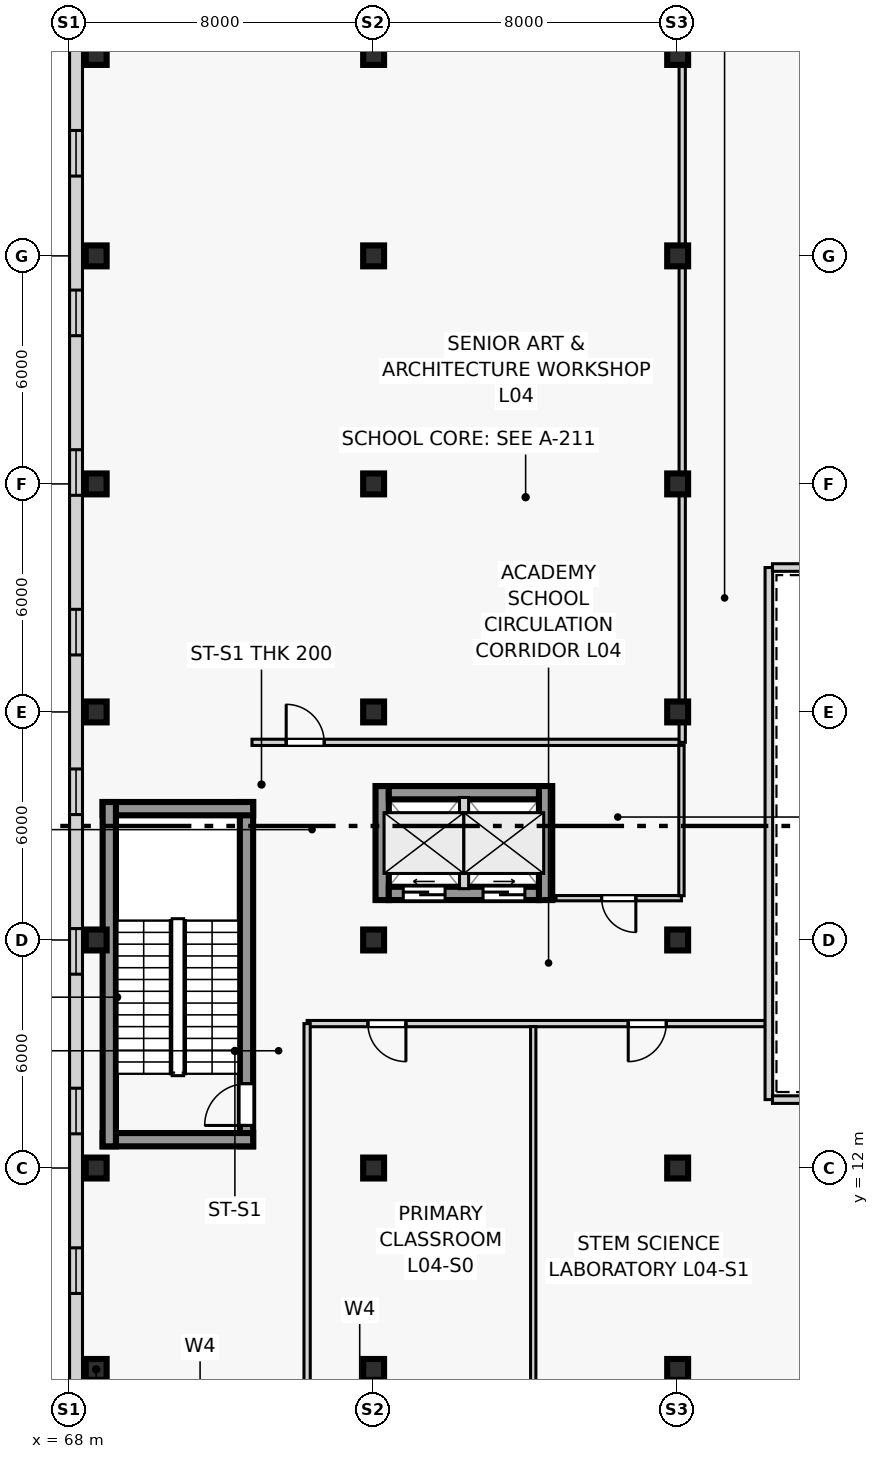
"""IFC4 building model, lengths in metres.
Left out: names, types, materials, properties, quantities, classifications, styles, units other than length and angle.
Written with IfcOpenShell. Run it as: python <this file> out.ifc"""

import sys

from ifc_helpers import new_model, si_unit, direction, frame, frame_2d, origin, origin_2d, place, context, subcontext, project, spatial, rectangle, extrude, source, transform, mapped, element, fill, save


model = new_model("IFC4")
c1 = context("Model", 3, precision=1e-05, world=origin(), true_north=direction((0.0, 1.0)))
c2 = subcontext(c1, "Body", "Model", "MODEL_VIEW")
j1 = project(units=[si_unit("LENGTHUNIT", "METRE"), si_unit("PLANEANGLEUNIT", "RADIAN")], contexts=[c1])
p1 = place(None, origin())
s1 = spatial("IfcSite", under=j1, at=p1, CompositionType="ELEMENT")
p2 = place(p1, origin())
s2 = spatial("IfcBuilding", under=s1, at=p2, CompositionType="ELEMENT")
p3 = place(p2, frame((0.0, 0.0, 18.0)))
s3 = spatial("IfcBuildingStorey", under=s2, at=p3, CompositionType="ELEMENT", Elevation=18.0)
p4 = place(p3, frame((72.655, 12.57, 0.0), z_axis=(0.0, 0.0, 1.0), x_axis=(0.0, 1.0, 0.0)))
e1 = element("IfcWall", 1, at=p4, inside=s3, PredefinedType="SHEAR", context=c2, shape_type="SweptSolid", body=[
    extrude(rectangle(XDim=9.06, YDim=0.35, at=frame_2d((4.53, 0.0))), origin(), (0.0, 0.0, 1.0), 4.5),
])
p5 = place(p4, frame((0.55, 0.0, 0.0)))
e2 = element("IfcOpeningElement", 2, at=p5, cuts=e1, PredefinedType="OPENING", context=c2, shape_type="SweptSolid", body=[
    extrude(rectangle(XDim=1.1, YDim=2.2, at=frame_2d((0.55, 1.1))), frame((0.0, 0.185, 0.0), z_axis=(0.0, -1.0, 0.0), x_axis=(1.0, 0.0, 0.0)), (0.0, 0.0, 1.0), 0.37),
])
for number, where, z_axis, x_axis in (
    (3, (68.87, 12.745, 0.0), (0.0, 0.0, 1.0), (1.0, 0.0, 0.0)),
    (4, (68.87, 21.455, 0.0), (0.0, 0.0, 1.0), (1.0, 0.0, 0.0)),
):
    element("IfcWall", number, at=place(p3, frame(where, z_axis=z_axis, x_axis=x_axis)), inside=s3, PredefinedType="SHEAR", context=c2, shape_type="SweptSolid", body=[
        extrude(rectangle(XDim=3.96, YDim=0.35, at=frame_2d((1.98, 0.0))), origin(), (0.0, 0.0, 1.0), 4.5),
    ])
p6 = place(p3, frame((69.045, 12.57, 0.0), z_axis=(0.0, 0.0, 1.0), x_axis=(0.0, 1.0, 0.0)))
e5 = element("IfcWall", 5, at=p6, inside=s3, PredefinedType="SHEAR", context=c2, shape_type="SweptSolid", body=[
    extrude(rectangle(XDim=9.06, YDim=0.35, at=frame_2d((4.53, 0.0))), origin(), (0.0, 0.0, 1.0), 4.5),
])
for number, where, z_axis, x_axis in (
    (6, (76.225, 19.05, 0.0), (0.0, 0.0, 1.0), (0.0, 1.0, 0.0)),
    (7, (80.525, 19.05, 0.0), (0.0, 0.0, 1.0), (0.0, 1.0, 0.0)),
):
    element("IfcWall", number, at=place(p3, frame(where, z_axis=z_axis, x_axis=x_axis)), inside=s3, PredefinedType="SHEAR", context=c2, shape_type="SweptSolid", body=[
        extrude(rectangle(XDim=3.0, YDim=0.35, at=frame_2d((1.5, 0.0))), origin(), (0.0, 0.0, 1.0), 4.5),
    ])
p7 = place(p3, frame((76.4, 21.875, 0.0), z_axis=(0.0, 0.0, 1.0), x_axis=(1.0, 0.0, 0.0)))
e8 = element("IfcWall", 8, at=p7, inside=s3, PredefinedType="SHEAR", context=c2, shape_type="SweptSolid", body=[
    extrude(rectangle(XDim=3.95, YDim=0.35, at=frame_2d((1.975, 0.0))), origin(), (0.0, 0.0, 1.0), 4.5),
])
p8 = place(p3, frame((76.4, 19.225, 0.0), z_axis=(0.0, 0.0, 1.0), x_axis=(1.0, 0.0, 0.0)))
e9 = element("IfcWall", 9, at=p8, inside=s3, PredefinedType="SHEAR", context=c2, shape_type="SweptSolid", body=[
    extrude(rectangle(XDim=3.95, YDim=0.35, at=frame_2d((1.975, 0.0))), origin(), (0.0, 0.0, 1.0), 4.5),
])
p9 = place(p8, frame((0.38, 0.0, 0.0)))
e10 = element("IfcOpeningElement", 10, at=p9, cuts=e9, PredefinedType="OPENING", context=c2, shape_type="SweptSolid", body=[
    extrude(rectangle(XDim=1.1, YDim=2.2, at=frame_2d((0.55, 1.1))), frame((0.0, 0.185, 0.0), z_axis=(0.0, -1.0, 0.0), x_axis=(1.0, 0.0, 0.0)), (0.0, 0.0, 1.0), 0.37),
])
p10 = place(p8, frame((2.48, 0.0, 0.0)))
e11 = element("IfcOpeningElement", 11, at=p10, cuts=e9, PredefinedType="OPENING", context=c2, shape_type="SweptSolid", body=[
    extrude(rectangle(XDim=1.1, YDim=2.2, at=frame_2d((0.55, 1.1))), frame((0.0, 0.185, 0.0), z_axis=(0.0, -1.0, 0.0), x_axis=(1.0, 0.0, 0.0)), (0.0, 0.0, 1.0), 0.37),
])
m1 = source(origin(), c2, "Body", "SweptSolid", [
    extrude(rectangle(XDim=0.55, YDim=0.55, at=origin_2d()), origin(), (0.0, 0.0, 1.0), 4.5),
])
for number, where, z_axis, x_axis in (
    (12, (68.7, 6.7, 0.0), (0.0, 0.0, 1.0), (1.0, 0.0, 0.0)),
    (13, (68.7, 12.0, 0.0), (0.0, 0.0, 1.0), (1.0, 0.0, 0.0)),
    (14, (68.7, 18.0, 0.0), (0.0, 0.0, 1.0), (1.0, 0.0, 0.0)),
    (15, (68.7, 24.0, 0.0), (0.0, 0.0, 1.0), (1.0, 0.0, 0.0)),
    (16, (68.7, 30.0, 0.0), (0.0, 0.0, 1.0), (1.0, 0.0, 0.0)),
    (17, (68.7, 36.0, 0.0), (0.0, 0.0, 1.0), (1.0, 0.0, 0.0)),
    (18, (68.7, 41.3, 0.0), (0.0, 0.0, 1.0), (1.0, 0.0, 0.0)),
    (19, (76.0, 6.7, 0.0), (0.0, 0.0, 1.0), (1.0, 0.0, 0.0)),
    (20, (76.0, 12.0, 0.0), (0.0, 0.0, 1.0), (1.0, 0.0, 0.0)),
    (21, (76.0, 18.0, 0.0), (0.0, 0.0, 1.0), (1.0, 0.0, 0.0)),
    (22, (76.0, 24.0, 0.0), (0.0, 0.0, 1.0), (1.0, 0.0, 0.0)),
    (23, (76.0, 30.0, 0.0), (0.0, 0.0, 1.0), (1.0, 0.0, 0.0)),
    (24, (76.0, 36.0, 0.0), (0.0, 0.0, 1.0), (1.0, 0.0, 0.0)),
    (25, (76.0, 41.3, 0.0), (0.0, 0.0, 1.0), (1.0, 0.0, 0.0)),
    (26, (84.0, 6.7, 0.0), (0.0, 0.0, 1.0), (1.0, 0.0, 0.0)),
    (27, (84.0, 12.0, 0.0), (0.0, 0.0, 1.0), (1.0, 0.0, 0.0)),
    (28, (84.0, 18.0, 0.0), (0.0, 0.0, 1.0), (1.0, 0.0, 0.0)),
    (29, (84.0, 24.0, 0.0), (0.0, 0.0, 1.0), (1.0, 0.0, 0.0)),
    (30, (84.0, 30.0, 0.0), (0.0, 0.0, 1.0), (1.0, 0.0, 0.0)),
    (31, (84.0, 36.0, 0.0), (0.0, 0.0, 1.0), (1.0, 0.0, 0.0)),
    (32, (84.0, 41.3, 0.0), (0.0, 0.0, 1.0), (1.0, 0.0, 0.0)),
):
    element("IfcColumn", number, at=place(p3, frame(where, z_axis=z_axis, x_axis=x_axis)), inside=s3, PredefinedType="COLUMN", context=c2, shape_type="MappedRepresentation", body=[
        mapped(m1, transform((0.0, 0.0, 0.0), scale=1.0)),
    ])
p11 = place(p3, frame((68.17, 41.83, 0.0), z_axis=(0.0, 0.0, 1.0), x_axis=(0.0, -1.0, 0.0)))
e33 = element("IfcWall", 33, at=p11, inside=s3, PredefinedType="SOLIDWALL", context=c2, shape_type="SweptSolid", body=[
    extrude(rectangle(XDim=35.66, YDim=0.34, at=frame_2d((17.83, 0.0))), origin(), (0.0, 0.0, 1.0), 4.2),
])
p12 = place(p11, frame((2.53, 0.0, 0.95)))
e34 = element("IfcOpeningElement", 34, at=p12, cuts=e33, PredefinedType="OPENING", context=c2, shape_type="SweptSolid", body=[
    extrude(rectangle(XDim=1.2, YDim=1.5, at=frame_2d((0.6, 0.75))), frame((0.0, 0.18, 0.0), z_axis=(0.0, -1.0, 0.0), x_axis=(1.0, 0.0, 0.0)), (0.0, 0.0, 1.0), 0.36),
])
p13 = place(p11, frame((6.73, 0.0, 0.95)))
e35 = element("IfcOpeningElement", 35, at=p13, cuts=e33, PredefinedType="OPENING", context=c2, shape_type="SweptSolid", body=[
    extrude(rectangle(XDim=1.2, YDim=1.5, at=frame_2d((0.6, 0.75))), frame((0.0, 0.18, 0.0), z_axis=(0.0, -1.0, 0.0), x_axis=(1.0, 0.0, 0.0)), (0.0, 0.0, 1.0), 0.36),
])
p14 = place(p11, frame((10.93, 0.0, 0.95)))
e36 = element("IfcOpeningElement", 36, at=p14, cuts=e33, PredefinedType="OPENING", context=c2, shape_type="SweptSolid", body=[
    extrude(rectangle(XDim=1.2, YDim=1.5, at=frame_2d((0.6, 0.75))), frame((0.0, 0.18, 0.0), z_axis=(0.0, -1.0, 0.0), x_axis=(1.0, 0.0, 0.0)), (0.0, 0.0, 1.0), 0.36),
])
p15 = place(p11, frame((15.13, 0.0, 0.95)))
e37 = element("IfcOpeningElement", 37, at=p15, cuts=e33, PredefinedType="OPENING", context=c2, shape_type="SweptSolid", body=[
    extrude(rectangle(XDim=1.2, YDim=1.5, at=frame_2d((0.6, 0.75))), frame((0.0, 0.18, 0.0), z_axis=(0.0, -1.0, 0.0), x_axis=(1.0, 0.0, 0.0)), (0.0, 0.0, 1.0), 0.36),
])
p16 = place(p11, frame((19.33, 0.0, 0.95)))
e38 = element("IfcOpeningElement", 38, at=p16, cuts=e33, PredefinedType="OPENING", context=c2, shape_type="SweptSolid", body=[
    extrude(rectangle(XDim=1.2, YDim=1.5, at=frame_2d((0.6, 0.75))), frame((0.0, 0.18, 0.0), z_axis=(0.0, -1.0, 0.0), x_axis=(1.0, 0.0, 0.0)), (0.0, 0.0, 1.0), 0.36),
])
p17 = place(p11, frame((23.53, 0.0, 0.95)))
e39 = element("IfcOpeningElement", 39, at=p17, cuts=e33, PredefinedType="OPENING", context=c2, shape_type="SweptSolid", body=[
    extrude(rectangle(XDim=1.2, YDim=1.5, at=frame_2d((0.6, 0.75))), frame((0.0, 0.18, 0.0), z_axis=(0.0, -1.0, 0.0), x_axis=(1.0, 0.0, 0.0)), (0.0, 0.0, 1.0), 0.36),
])
p18 = place(p11, frame((27.73, 0.0, 0.95)))
e40 = element("IfcOpeningElement", 40, at=p18, cuts=e33, PredefinedType="OPENING", context=c2, shape_type="SweptSolid", body=[
    extrude(rectangle(XDim=1.2, YDim=1.5, at=frame_2d((0.6, 0.75))), frame((0.0, 0.18, 0.0), z_axis=(0.0, -1.0, 0.0), x_axis=(1.0, 0.0, 0.0)), (0.0, 0.0, 1.0), 0.36),
])
p19 = place(p11, frame((31.93, 0.0, 0.95)))
e41 = element("IfcOpeningElement", 41, at=p19, cuts=e33, PredefinedType="OPENING", context=c2, shape_type="SweptSolid", body=[
    extrude(rectangle(XDim=1.2, YDim=1.5, at=frame_2d((0.6, 0.75))), frame((0.0, 0.18, 0.0), z_axis=(0.0, -1.0, 0.0), x_axis=(1.0, 0.0, 0.0)), (0.0, 0.0, 1.0), 0.36),
])
p20 = place(p3, frame((78.38, 19.35, 0.0), z_axis=(0.0, 0.0, 1.0), x_axis=(0.0, 1.0, 0.0)))
e42 = element("IfcWall", 42, at=p20, inside=s3, PredefinedType="PARTITIONING", context=c2, shape_type="SweptSolid", body=[
    extrude(rectangle(XDim=2.4, YDim=0.24, at=frame_2d((1.2, 0.0))), origin(), (0.0, 0.0, 1.0), 4.19),
])
p21 = place(p3, frame((74.25, 15.8, 0.0), z_axis=(0.0, 0.0, 1.0), x_axis=(1.0, 0.0, 0.0)))
e43 = element("IfcWall", 43, at=p21, inside=s3, PredefinedType="PARTITIONING", context=c2, shape_type="SweptSolid", body=[
    extrude(rectangle(XDim=12.055, YDim=0.165, at=frame_2d((6.027, 0.0))), origin(), (0.0, 0.0, 1.0), 4.19),
])
p22 = place(p21, frame((1.6, 0.0, 0.0)))
e44 = element("IfcOpeningElement", 44, at=p22, cuts=e43, PredefinedType="OPENING", context=c2, shape_type="SweptSolid", body=[
    extrude(rectangle(XDim=1.0, YDim=2.15, at=frame_2d((0.5, 1.075))), frame((0.0, 0.093, 0.0), z_axis=(0.0, -1.0, 0.0), x_axis=(1.0, 0.0, 0.0)), (0.0, 0.0, 1.0), 0.185),
])
p23 = place(p21, frame((8.45, 0.0, 0.0)))
e45 = element("IfcOpeningElement", 45, at=p23, cuts=e43, PredefinedType="OPENING", context=c2, shape_type="SweptSolid", body=[
    extrude(rectangle(XDim=1.0, YDim=2.15, at=frame_2d((0.5, 1.075))), frame((0.0, 0.093, 0.0), z_axis=(0.0, -1.0, 0.0), x_axis=(1.0, 0.0, 0.0)), (0.0, 0.0, 1.0), 0.185),
])
p24 = place(p3, frame((72.8, 23.2, 0.0), z_axis=(0.0, 0.0, 1.0), x_axis=(1.0, 0.0, 0.0)))
e46 = element("IfcWall", 46, at=p24, inside=s3, PredefinedType="PARTITIONING", context=c2, shape_type="SweptSolid", body=[
    extrude(rectangle(XDim=11.242, YDim=0.165, at=frame_2d((5.621, 0.0))), origin(), (0.0, 0.0, 1.0), 4.19),
])
p25 = place(p24, frame((0.9, 0.0, 0.0)))
e47 = element("IfcOpeningElement", 47, at=p25, cuts=e46, PredefinedType="OPENING", context=c2, shape_type="SweptSolid", body=[
    extrude(rectangle(XDim=1.0, YDim=2.15, at=frame_2d((0.5, 1.075))), frame((0.0, 0.093, 0.0), z_axis=(0.0, -1.0, 0.0), x_axis=(1.0, 0.0, 0.0)), (0.0, 0.0, 1.0), 0.185),
])
p26 = place(p3, frame((80.8, 19.1, 0.0), z_axis=(0.0, 0.0, 1.0), x_axis=(1.0, 0.0, 0.0)))
e48 = element("IfcWall", 48, at=p26, inside=s3, PredefinedType="PLUMBINGWALL", context=c2, shape_type="SweptSolid", body=[
    extrude(rectangle(XDim=3.3, YDim=0.14, at=frame_2d((1.65, 0.0))), origin(), (0.0, 0.0, 1.0), 4.19),
])
p27 = place(p26, frame((1.2, 0.0, 0.0)))
e49 = element("IfcOpeningElement", 49, at=p27, cuts=e48, PredefinedType="OPENING", context=c2, shape_type="SweptSolid", body=[
    extrude(rectangle(XDim=0.9, YDim=2.1, at=frame_2d((0.45, 1.05))), frame((0.0, 0.08, 0.0), z_axis=(0.0, -1.0, 0.0), x_axis=(1.0, 0.0, 0.0)), (0.0, 0.0, 1.0), 0.16),
])
p28 = place(p3, frame((84.1, 19.165, 0.0), z_axis=(0.0, 0.0, 1.0), x_axis=(0.0, 1.0, 0.0)))
e50 = element("IfcWall", 50, at=p28, inside=s3, PredefinedType="PLUMBINGWALL", context=c2, shape_type="SweptSolid", body=[
    extrude(rectangle(XDim=3.958, YDim=0.14, at=frame_2d((1.979, 0.0))), origin(), (0.0, 0.0, 1.0), 3.54),
])
p29 = place(p3, frame((80.2, 6.185, 0.0), z_axis=(0.0, 0.0, 1.0), x_axis=(0.0, 1.0, 0.0)))
e51 = element("IfcWall", 51, at=p29, inside=s3, PredefinedType="PARTITIONING", context=c2, shape_type="SweptSolid", body=[
    extrude(rectangle(XDim=9.537, YDim=0.14, at=frame_2d((4.769, 0.0))), origin(), (0.0, 0.0, 1.0), 4.19),
])
p30 = place(p3, frame((86.4, 13.8, 0.0), z_axis=(0.0, 0.0, 1.0), x_axis=(0.0, 1.0, 0.0)))
e52 = element("IfcWall", 52, at=p30, inside=s3, PredefinedType="PARTITIONING", context=c2, shape_type="SweptSolid", body=[
    extrude(rectangle(XDim=14.0, YDim=0.2, at=frame_2d((7.0, 0.0))), origin(), (0.0, 0.0, 1.0), 4.19),
])
for number, where, z_axis, x_axis in (
    (53, (86.495, 27.8, 0.0), (0.0, 0.0, 1.0), (1.0, 0.0, 0.0)),
    (54, (86.495, 13.8, 0.0), (0.0, 0.0, 1.0), (1.0, 0.0, 0.0)),
):
    element("IfcWall", number, at=place(p3, frame(where, z_axis=z_axis, x_axis=x_axis)), inside=s3, PredefinedType="PARTITIONING", context=c2, shape_type="SweptSolid", body=[
        extrude(rectangle(XDim=16.01, YDim=0.2, at=frame_2d((8.005, 0.0))), origin(), (0.0, 0.0, 1.0), 4.19),
    ])
p31 = place(p3, frame((74.25, 6.185, 0.0), z_axis=(0.0, 0.0, 1.0), x_axis=(0.0, 1.0, 0.0)))
e55 = element("IfcWall", 55, at=p31, inside=s3, PredefinedType="PARTITIONING", context=c2, shape_type="SweptSolid", body=[
    extrude(rectangle(XDim=9.615, YDim=0.165, at=frame_2d((4.808, 0.0))), origin(), (0.0, 0.0, 1.0), 4.19),
])
p32 = place(p3, frame((84.12, 23.2, 0.0), z_axis=(0.0, 0.0, 1.0), x_axis=(0.0, 1.0, 0.0)))
e56 = element("IfcWall", 56, at=p32, inside=s3, PredefinedType="PARTITIONING", context=c2, shape_type="SweptSolid", body=[
    extrude(rectangle(XDim=18.615, YDim=0.165, at=frame_2d((9.308, 0.0))), origin(), (0.0, 0.0, 1.0), 3.54),
])
m2 = source(origin(), c2, "Body", "SweptSolid", [
    extrude(rectangle(XDim=1.2, YDim=1.5, at=frame_2d((0.6, 0.75))), frame((0.0, 0.03, 0.0), z_axis=(0.0, -1.0, 0.0), x_axis=(1.0, 0.0, 0.0)), (0.0, 0.0, 1.0), 0.06),
])
p33 = place(p12, origin())
e57 = element("IfcWindow", 57, at=p33, inside=s3, PartitioningType="SINGLE_PANEL", PredefinedType="WINDOW", context=c2, shape_type="MappedRepresentation", body=[
    mapped(m2, transform((0.0, 0.0, 0.0), scale=1.0)),
])
fill(e34, e57)
p34 = place(p13, origin())
e58 = element("IfcWindow", 58, at=p34, inside=s3, PartitioningType="SINGLE_PANEL", PredefinedType="WINDOW", context=c2, shape_type="MappedRepresentation", body=[
    mapped(m2, transform((0.0, 0.0, 0.0), scale=1.0)),
])
fill(e35, e58)
p35 = place(p14, origin())
e59 = element("IfcWindow", 59, at=p35, inside=s3, PartitioningType="SINGLE_PANEL", PredefinedType="WINDOW", context=c2, shape_type="MappedRepresentation", body=[
    mapped(m2, transform((0.0, 0.0, 0.0), scale=1.0)),
])
fill(e36, e59)
p36 = place(p15, origin())
e60 = element("IfcWindow", 60, at=p36, inside=s3, PartitioningType="SINGLE_PANEL", PredefinedType="WINDOW", context=c2, shape_type="MappedRepresentation", body=[
    mapped(m2, transform((0.0, 0.0, 0.0), scale=1.0)),
])
fill(e37, e60)
p37 = place(p16, origin())
e61 = element("IfcWindow", 61, at=p37, inside=s3, PartitioningType="SINGLE_PANEL", PredefinedType="WINDOW", context=c2, shape_type="MappedRepresentation", body=[
    mapped(m2, transform((0.0, 0.0, 0.0), scale=1.0)),
])
fill(e38, e61)
p38 = place(p17, origin())
e62 = element("IfcWindow", 62, at=p38, inside=s3, PartitioningType="SINGLE_PANEL", PredefinedType="WINDOW", context=c2, shape_type="MappedRepresentation", body=[
    mapped(m2, transform((0.0, 0.0, 0.0), scale=1.0)),
])
fill(e39, e62)
p39 = place(p18, origin())
e63 = element("IfcWindow", 63, at=p39, inside=s3, PartitioningType="SINGLE_PANEL", PredefinedType="WINDOW", context=c2, shape_type="MappedRepresentation", body=[
    mapped(m2, transform((0.0, 0.0, 0.0), scale=1.0)),
])
fill(e40, e63)
p40 = place(p19, origin())
e64 = element("IfcWindow", 64, at=p40, inside=s3, PartitioningType="SINGLE_PANEL", PredefinedType="WINDOW", context=c2, shape_type="MappedRepresentation", body=[
    mapped(m2, transform((0.0, 0.0, 0.0), scale=1.0)),
])
fill(e41, e64)
m3 = source(origin(), c2, "Body", "SweptSolid", [
    extrude(rectangle(XDim=1.1, YDim=2.2, at=frame_2d((0.55, 1.1))), frame((0.0, 0.025, 0.0), z_axis=(0.0, -1.0, 0.0), x_axis=(1.0, 0.0, 0.0)), (0.0, 0.0, 1.0), 0.05),
])
p41 = place(p5, origin())
e65 = element("IfcDoor", 65, at=p41, inside=s3, OperationType="SINGLE_SWING_LEFT", PredefinedType="DOOR", context=c2, shape_type="MappedRepresentation", body=[
    mapped(m3, transform((0.0, 0.0, 0.0), scale=1.0)),
])
fill(e2, e65)
m4 = source(origin(), c2, "Body", "SweptSolid", [
    extrude(rectangle(XDim=1.1, YDim=2.2, at=frame_2d((0.55, 1.1))), frame((0.0, 0.025, 0.0), z_axis=(0.0, -1.0, 0.0), x_axis=(1.0, 0.0, 0.0)), (0.0, 0.0, 1.0), 0.05),
])
p42 = place(p9, origin())
e66 = element("IfcDoor", 66, at=p42, inside=s3, OperationType="SLIDING_TO_LEFT", PredefinedType="DOOR", context=c2, shape_type="MappedRepresentation", body=[
    mapped(m4, transform((0.0, 0.0, 0.0), scale=1.0)),
])
fill(e10, e66)
p43 = place(p10, origin())
e67 = element("IfcDoor", 67, at=p43, inside=s3, OperationType="SLIDING_TO_RIGHT", PredefinedType="DOOR", context=c2, shape_type="MappedRepresentation", body=[
    mapped(m4, transform((0.0, 0.0, 0.0), scale=1.0)),
])
fill(e11, e67)
m5 = source(origin(), c2, "Body", "SweptSolid", [
    extrude(rectangle(XDim=0.9, YDim=2.1, at=frame_2d((0.45, 1.05))), frame((0.0, 0.025, 0.0), z_axis=(0.0, -1.0, 0.0), x_axis=(1.0, 0.0, 0.0)), (0.0, 0.0, 1.0), 0.05),
])
p44 = place(p27, frame((0.9, 0.0, 0.0), z_axis=(0.0, 0.0, 1.0), x_axis=(-1.0, 0.0, 0.0)))
e68 = element("IfcDoor", 68, at=p44, inside=s3, OperationType="SINGLE_SWING_LEFT", PredefinedType="DOOR", context=c2, shape_type="MappedRepresentation", body=[
    mapped(m5, transform((0.0, 0.0, 0.0), scale=1.0)),
])
fill(e49, e68)
m6 = source(origin(), c2, "Body", "SweptSolid", [
    extrude(rectangle(XDim=1.0, YDim=2.15, at=frame_2d((0.5, 1.075))), frame((0.0, 0.025, 0.0), z_axis=(0.0, -1.0, 0.0), x_axis=(1.0, 0.0, 0.0)), (0.0, 0.0, 1.0), 0.05),
])
p45 = place(p22, frame((1.0, 0.0, 0.0), z_axis=(0.0, 0.0, 1.0), x_axis=(-1.0, 0.0, 0.0)))
e69 = element("IfcDoor", 69, at=p45, inside=s3, OperationType="SINGLE_SWING_LEFT", PredefinedType="DOOR", context=c2, shape_type="MappedRepresentation", body=[
    mapped(m6, transform((0.0, 0.0, 0.0), scale=1.0)),
])
fill(e44, e69)
p46 = place(p23, frame((1.0, 0.0, 0.0), z_axis=(0.0, 0.0, 1.0), x_axis=(-1.0, 0.0, 0.0)))
e70 = element("IfcDoor", 70, at=p46, inside=s3, OperationType="SINGLE_SWING_RIGHT", PredefinedType="DOOR", context=c2, shape_type="MappedRepresentation", body=[
    mapped(m6, transform((0.0, 0.0, 0.0), scale=1.0)),
])
fill(e45, e70)
p47 = place(p25, origin())
e71 = element("IfcDoor", 71, at=p47, inside=s3, OperationType="SINGLE_SWING_LEFT", PredefinedType="DOOR", context=c2, shape_type="MappedRepresentation", body=[
    mapped(m6, transform((0.0, 0.0, 0.0), scale=1.0)),
])
fill(e47, e71)
save(model, sys.argv[1])
